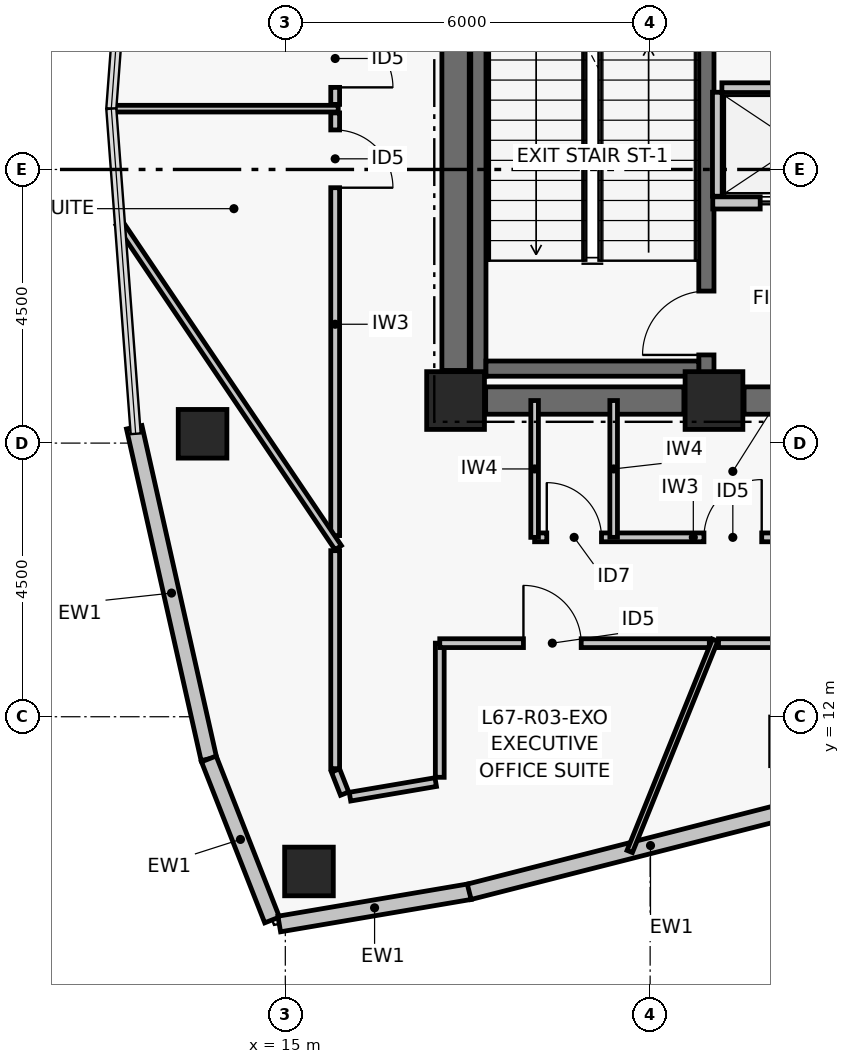
"""IFC4 building model, lengths in metres.
Left out: names, types, materials, properties, quantities, classifications, styles, units other than length and angle.
Written with IfcOpenShell. Run it as: python <this file> out.ifc"""

import sys

from ifc_helpers import new_model, si_unit, direction, frame, frame_2d, origin, origin_2d, place, context, subcontext, project, spatial, rectangle, hollow_rectangle, extrude, element, fill, save


model = new_model("IFC4")
c1 = context("Model", 3, precision=1e-05, world=origin(), true_north=direction((0.0, 1.0)))
c2 = subcontext(c1, "Body", "Model", "MODEL_VIEW")
j1 = project(units=[si_unit("LENGTHUNIT", "METRE"), si_unit("PLANEANGLEUNIT", "RADIAN")], contexts=[c1])
p1 = place(None, origin())
s1 = spatial("IfcSite", under=j1, at=p1, CompositionType="ELEMENT")
p2 = place(p1, origin())
s2 = spatial("IfcBuilding", under=s1, at=p2, CompositionType="ELEMENT")
p3 = place(p2, frame((0.0, 0.0, 265.74)))
s3 = spatial("IfcBuildingStorey", under=s2, at=p3, CompositionType="ELEMENT", Elevation=265.74)
for number, where, z_axis, x_axis in (
    (1, (17.8, 17.2, 0.0), (0.0, 0.0, 1.0), (1.0, 0.0, 0.0)),
    (2, (22.05, 17.2, 0.0), (0.0, 0.0, 1.0), (1.0, 0.0, 0.0)),
):
    element("IfcColumn", number, at=place(p3, frame(where, z_axis=z_axis, x_axis=x_axis)), inside=s3, PredefinedType="COLUMN", context=c2, shape_type="SweptSolid", body=[
        extrude(rectangle(XDim=0.95, YDim=0.95, at=origin_2d()), origin(), (0.0, 0.0, 1.0), 3.72),
    ])
p4 = place(p3, frame((18.295, 17.2, 0.0), z_axis=(0.0, 0.0, 1.0), x_axis=(1.0, 0.0, 0.0)))
e3 = element("IfcWall", 3, at=p4, inside=s3, PredefinedType="SHEAR", context=c2, shape_type="SweptSolid", body=[
    extrude(rectangle(XDim=3.26, YDim=0.45, at=frame_2d((1.63, 0.0))), origin(), (0.0, 0.0, 1.0), 3.5),
])
p5 = place(p3, frame((22.545, 17.2, 0.0), z_axis=(0.0, 0.0, 1.0), x_axis=(1.0, 0.0, 0.0)))
e4 = element("IfcWall", 4, at=p5, inside=s3, PredefinedType="SHEAR", context=c2, shape_type="SweptSolid", body=[
    extrude(rectangle(XDim=1.805, YDim=0.45, at=frame_2d((0.903, 0.0))), origin(), (0.0, 0.0, 1.0), 3.5),
])
p6 = place(p3, frame((17.8, 17.695, 0.0), z_axis=(0.0, 0.0, 1.0), x_axis=(0.0, 1.0, 0.0)))
e5 = element("IfcWall", 5, at=p6, inside=s3, PredefinedType="SHEAR", context=c2, shape_type="SweptSolid", body=[
    extrude(rectangle(XDim=8.61, YDim=0.45, at=frame_2d((4.305, 0.0))), origin(), (0.0, 0.0, 1.0), 3.5),
])
p7 = place(p3, frame((18.175, 17.6, 0.0), z_axis=(0.0, 0.0, 1.0), x_axis=(0.0, 1.0, 0.0)))
e6 = element("IfcWall", 6, at=p7, inside=s3, PredefinedType="SHEAR", context=c2, shape_type="SweptSolid", body=[
    extrude(rectangle(XDim=8.8, YDim=0.25, at=frame_2d((4.4, 0.0))), origin(), (0.0, 0.0, 1.0), 3.5),
])
p8 = place(p3, frame((21.925, 17.6, 0.0), z_axis=(0.0, 0.0, 1.0), x_axis=(0.0, 1.0, 0.0)))
e7 = element("IfcWall", 7, at=p8, inside=s3, PredefinedType="SHEAR", context=c2, shape_type="SweptSolid", body=[
    extrude(rectangle(XDim=8.8, YDim=0.25, at=frame_2d((4.4, 0.0))), origin(), (0.0, 0.0, 1.0), 3.5),
])
p9 = place(p8, frame((0.35, 0.0, 0.0)))
e8 = element("IfcOpeningElement", 8, at=p9, cuts=e7, PredefinedType="OPENING", context=c2, shape_type="SweptSolid", body=[
    extrude(rectangle(XDim=1.05, YDim=2.08, at=frame_2d((0.525, 1.04))), frame((0.0, 0.135, 0.0), z_axis=(0.0, -1.0, 0.0), x_axis=(1.0, 0.0, 0.0)), (0.0, 0.0, 1.0), 0.27),
])
p10 = place(p3, frame((18.3, 17.725, 0.0), z_axis=(0.0, 0.0, 1.0), x_axis=(1.0, 0.0, 0.0)))
e9 = element("IfcWall", 9, at=p10, inside=s3, PredefinedType="SHEAR", context=c2, shape_type="SweptSolid", body=[
    extrude(rectangle(XDim=3.5, YDim=0.25, at=frame_2d((1.75, 0.0))), origin(), (0.0, 0.0, 1.0), 3.5),
])
for number, where, z_axis, x_axis in (
    (10, (13.639, 16.653, 0.0), (0.0, 0.0, 1.0), (1.0, 0.0, 0.0)),
    (11, (15.389, 9.455, 0.0), (0.0, 0.0, 1.0), (1.0, 0.0, 0.0)),
):
    element("IfcColumn", number, at=place(p3, frame(where, z_axis=z_axis, x_axis=x_axis)), inside=s3, PredefinedType="COLUMN", context=c2, shape_type="SweptSolid", body=[
        extrude(hollow_rectangle(XDim=0.8, YDim=0.8, WallThickness=0.035, at=origin_2d()), origin(), (0.0, 0.0, 1.0), 3.72),
    ])
p11 = place(p3, frame((13.742, 11.307, 0.0), z_axis=(0.0, 0.0, 1.0), x_axis=(-0.219500763731, 0.97561232809, 0.0)))
e12 = element("IfcWall", 12, at=p11, inside=s3, PredefinedType="PARTITIONING", context=c2, shape_type="SweptSolid", body=[
    extrude(rectangle(XDim=5.59, YDim=0.26, at=frame_2d((2.795, 0.0))), origin(), (0.0, 0.0, 1.0), 3.5),
])
p12 = place(p3, frame((14.782, 8.658, 0.0), z_axis=(0.0, 0.0, 1.0), x_axis=(-0.36559927932, 0.930772349697, 0.0)))
e13 = element("IfcWall", 13, at=p12, inside=s3, PredefinedType="PARTITIONING", context=c2, shape_type="SweptSolid", body=[
    extrude(rectangle(XDim=2.845, YDim=0.26, at=frame_2d((1.423, 0.0))), origin(), (0.0, 0.0, 1.0), 3.5),
])
p13 = place(p3, frame((18.036, 9.124, 0.0), z_axis=(0.0, 0.0, 1.0), x_axis=(-0.985889432766, -0.167397808709, 0.0)))
e14 = element("IfcWall", 14, at=p13, inside=s3, PredefinedType="PARTITIONING", context=c2, shape_type="SweptSolid", body=[
    extrude(rectangle(XDim=3.181, YDim=0.26, at=frame_2d((1.59, 0.0))), origin(), (0.0, 0.0, 1.0), 3.5),
])
p14 = place(p3, frame((23.988, 10.642, 0.0), z_axis=(0.0, 0.0, 1.0), x_axis=(-0.968988278672, -0.247106689096, 0.0)))
e15 = element("IfcWall", 15, at=p14, inside=s3, PredefinedType="PARTITIONING", context=c2, shape_type="SweptSolid", body=[
    extrude(rectangle(XDim=6.154, YDim=0.26, at=frame_2d((3.077, 0.0))), origin(), (0.0, 0.0, 1.0), 3.5),
])
p15 = place(p3, frame((22.03, 20.45, 0.0), z_axis=(0.0, 0.0, 1.0), x_axis=(1.0, 0.0, 0.0)))
e16 = element("IfcWall", 16, at=p15, inside=s3, PredefinedType="PARTITIONING", context=c2, shape_type="SweptSolid", body=[
    extrude(rectangle(XDim=2.8, YDim=0.2, at=frame_2d((1.4, 0.0))), origin(), (0.0, 0.0, 1.0), 3.5),
])
p16 = place(p15, frame((0.78, 0.0, 0.0)))
e17 = element("IfcOpeningElement", 17, at=p16, cuts=e16, PredefinedType="OPENING", context=c2, shape_type="SweptSolid", body=[
    extrude(rectangle(XDim=1.1, YDim=2.08, at=frame_2d((0.55, 1.04))), frame((0.0, 0.11, 0.0), z_axis=(0.0, -1.0, 0.0), x_axis=(1.0, 0.0, 0.0)), (0.0, 0.0, 1.0), 0.22),
])
p17 = place(p3, frame((22.105, 20.56, 0.0), z_axis=(0.0, 0.0, 1.0), x_axis=(0.0, 1.0, 0.0)))
e18 = element("IfcWall", 18, at=p17, inside=s3, PredefinedType="PARTITIONING", context=c2, shape_type="SweptSolid", body=[
    extrude(rectangle(XDim=1.71, YDim=0.16, at=frame_2d((0.855, 0.0))), origin(), (0.0, 0.0, 1.0), 3.5),
])
p18 = place(p3, frame((22.18, 22.345, 0.0), z_axis=(0.0, 0.0, 1.0), x_axis=(1.0, 0.0, 0.0)))
e19 = element("IfcWall", 19, at=p18, inside=s3, PredefinedType="PARTITIONING", context=c2, shape_type="SweptSolid", body=[
    extrude(rectangle(XDim=2.65, YDim=0.16, at=frame_2d((1.325, 0.0))), origin(), (0.0, 0.0, 1.0), 3.5),
])
p19 = place(p3, frame((19.1, 14.95, 0.0), z_axis=(0.0, 0.0, 1.0), x_axis=(1.0, 0.0, 0.0)))
e20 = element("IfcWall", 20, at=p19, inside=s3, PredefinedType="PARTITIONING", context=c2, shape_type="SweptSolid", body=[
    extrude(rectangle(XDim=5.22, YDim=0.145, at=frame_2d((2.61, 0.0))), origin(), (0.0, 0.0, 1.0), 2.78),
])
p20 = place(p19, frame((0.2, 0.0, 0.0)))
e21 = element("IfcOpeningElement", 21, at=p20, cuts=e20, PredefinedType="OPENING", context=c2, shape_type="SweptSolid", body=[
    extrude(rectangle(XDim=0.9, YDim=2.02, at=frame_2d((0.45, 1.01))), frame((0.0, 0.083, 0.0), z_axis=(0.0, -1.0, 0.0), x_axis=(1.0, 0.0, 0.0)), (0.0, 0.0, 1.0), 0.165),
])
p21 = place(p19, frame((2.785, 0.0, 0.0)))
e22 = element("IfcOpeningElement", 22, at=p21, cuts=e20, PredefinedType="OPENING", context=c2, shape_type="SweptSolid", body=[
    extrude(rectangle(XDim=0.95, YDim=2.06, at=frame_2d((0.475, 1.03))), frame((0.0, 0.083, 0.0), z_axis=(0.0, -1.0, 0.0), x_axis=(1.0, 0.0, 0.0)), (0.0, 0.0, 1.0), 0.165),
])
for number, where, z_axis, x_axis in (
    (23, (19.1, 14.95, 0.0), (0.0, 0.0, 1.0), (0.0, 1.0, 0.0)),
    (24, (20.4, 14.95, 0.0), (0.0, 0.0, 1.0), (0.0, 1.0, 0.0)),
):
    element("IfcWall", number, at=place(p3, frame(where, z_axis=z_axis, x_axis=x_axis)), inside=s3, PredefinedType="PARTITIONING", context=c2, shape_type="SweptSolid", body=[
        extrude(rectangle(XDim=2.25, YDim=0.125, at=frame_2d((1.125, 0.0))), origin(), (0.0, 0.0, 1.0), 2.63),
    ])
p22 = place(p3, frame((15.82, 21.93, 0.0), z_axis=(0.0, 0.0, 1.0), x_axis=(0.0, -1.0, 0.0)))
e25 = element("IfcWall", 25, at=p22, inside=s3, PredefinedType="PARTITIONING", context=c2, shape_type="SweptSolid", body=[
    extrude(rectangle(XDim=6.951, YDim=0.145, at=frame_2d((3.475, 0.0))), origin(), (0.0, 0.0, 1.0), 2.78),
])
p23 = place(p22, frame((0.28, 0.0, 0.0)))
e26 = element("IfcOpeningElement", 26, at=p23, cuts=e25, PredefinedType="OPENING", context=c2, shape_type="SweptSolid", body=[
    extrude(rectangle(XDim=0.95, YDim=2.06, at=frame_2d((0.475, 1.03))), frame((0.0, 0.083, 0.0), z_axis=(0.0, -1.0, 0.0), x_axis=(1.0, 0.0, 0.0)), (0.0, 0.0, 1.0), 0.165),
])
p24 = place(p3, frame((15.82, 14.731, 0.0), z_axis=(0.0, 0.0, 1.0), x_axis=(0.0, -1.0, 0.0)))
e27 = element("IfcWall", 27, at=p24, inside=s3, PredefinedType="PARTITIONING", context=c2, shape_type="SweptSolid", body=[
    extrude(rectangle(XDim=3.585, YDim=0.145, at=frame_2d((1.792, 0.0))), origin(), (0.0, 0.0, 1.0), 2.78),
])
p25 = place(p3, frame((15.825, 11.117, 0.0), z_axis=(0.0, 0.0, 1.0), x_axis=(0.365633948196, -0.930758731319, 0.0)))
e28 = element("IfcWall", 28, at=p25, inside=s3, PredefinedType="PARTITIONING", context=c2, shape_type="SweptSolid", body=[
    extrude(rectangle(XDim=0.41, YDim=0.145, at=frame_2d((0.205, 0.0))), origin(), (0.0, 0.0, 1.0), 2.78),
])
p26 = place(p3, frame((16.063, 10.686, 0.0), z_axis=(0.0, 0.0, 1.0), x_axis=(0.985881780308, 0.167442871621, 0.0)))
e29 = element("IfcWall", 29, at=p26, inside=s3, PredefinedType="PARTITIONING", context=c2, shape_type="SweptSolid", body=[
    extrude(rectangle(XDim=1.43, YDim=0.145, at=frame_2d((0.715, 0.0))), origin(), (0.0, 0.0, 1.0), 3.13),
])
p27 = place(p3, frame((17.54, 11.004, 0.0), z_axis=(0.0, 0.0, 1.0), x_axis=(0.0, 1.0, 0.0)))
e30 = element("IfcWall", 30, at=p27, inside=s3, PredefinedType="PARTITIONING", context=c2, shape_type="SweptSolid", body=[
    extrude(rectangle(XDim=2.206, YDim=0.145, at=frame_2d((1.103, 0.0))), origin(), (0.0, 0.0, 1.0), 3.13),
])
p28 = place(p3, frame((17.54, 13.21, 0.0), z_axis=(0.0, 0.0, 1.0), x_axis=(1.0, 0.0, 0.0)))
e31 = element("IfcWall", 31, at=p28, inside=s3, PredefinedType="PARTITIONING", context=c2, shape_type="SweptSolid", body=[
    extrude(rectangle(XDim=4.433, YDim=0.145, at=frame_2d((2.217, 0.0))), origin(), (0.0, 0.0, 1.0), 3.13),
])
p29 = place(p28, frame((1.376, 0.0, 0.0)))
e32 = element("IfcOpeningElement", 32, at=p29, cuts=e31, PredefinedType="OPENING", context=c2, shape_type="SweptSolid", body=[
    extrude(rectangle(XDim=0.95, YDim=2.06, at=frame_2d((0.475, 1.03))), frame((0.0, 0.083, 0.0), z_axis=(0.0, -1.0, 0.0), x_axis=(1.0, 0.0, 0.0)), (0.0, 0.0, 1.0), 0.165),
])
p30 = place(p3, frame((22.124, 13.21, 0.0), z_axis=(0.0, 0.0, 1.0), x_axis=(1.0, 0.0, 0.0)))
e33 = element("IfcWall", 33, at=p30, inside=s3, PredefinedType="PARTITIONING", context=c2, shape_type="SweptSolid", body=[
    extrude(rectangle(XDim=6.986, YDim=0.145, at=frame_2d((3.493, 0.0))), origin(), (0.0, 0.0, 1.0), 2.78),
])
p31 = place(p30, frame((5.098, 0.0, 0.0)))
e34 = element("IfcOpeningElement", 34, at=p31, cuts=e33, PredefinedType="OPENING", context=c2, shape_type="SweptSolid", body=[
    extrude(rectangle(XDim=0.92, YDim=2.05, at=frame_2d((0.46, 1.025))), frame((0.0, 0.083, 0.0), z_axis=(0.0, -1.0, 0.0), x_axis=(1.0, 0.0, 0.0)), (0.0, 0.0, 1.0), 0.165),
])
p32 = place(p3, frame((15.82, 32.854, 0.0), z_axis=(0.0, 0.0, 1.0), x_axis=(0.0, -1.0, 0.0)))
e35 = element("IfcWall", 35, at=p32, inside=s3, PredefinedType="PARTITIONING", context=c2, shape_type="SweptSolid", body=[
    extrude(rectangle(XDim=10.784, YDim=0.145, at=frame_2d((5.392, 0.0))), origin(), (0.0, 0.0, 1.0), 2.78),
])
p33 = place(p32, frame((9.554, 0.0, 0.0)))
e36 = element("IfcOpeningElement", 36, at=p33, cuts=e35, PredefinedType="OPENING", context=c2, shape_type="SweptSolid", body=[
    extrude(rectangle(XDim=0.95, YDim=2.06, at=frame_2d((0.475, 1.03))), frame((0.0, 0.083, 0.0), z_axis=(0.0, -1.0, 0.0), x_axis=(1.0, 0.0, 0.0)), (0.0, 0.0, 1.0), 0.165),
])
p34 = place(p3, frame((15.87, 22.0, 0.0), z_axis=(0.0, 0.0, 1.0), x_axis=(-1.0, 0.0, 0.0)))
e37 = element("IfcWall", 37, at=p34, inside=s3, PredefinedType="PARTITIONING", context=c2, shape_type="SweptSolid", body=[
    extrude(rectangle(XDim=3.742, YDim=0.11, at=frame_2d((1.871, 0.0))), origin(), (0.0, 0.0, 1.0), 2.98),
])
p35 = place(p3, frame((22.069, 13.26, 0.0), z_axis=(0.0, 0.0, 1.0), x_axis=(-0.374599797966, -0.927186600078, 0.0)))
e38 = element("IfcWall", 38, at=p35, inside=s3, PredefinedType="PARTITIONING", context=c2, shape_type="SweptSolid", body=[
    extrude(rectangle(XDim=3.749, YDim=0.095, at=frame_2d((1.875, 0.0))), origin(), (0.0, 0.0, 1.0), 2.98),
])
p36 = place(p3, frame((12.269, 20.118, 0.0), z_axis=(0.0, 0.0, 1.0), x_axis=(0.559206512114, -0.829028393247, 0.0)))
e39 = element("IfcWall", 39, at=p36, inside=s3, PredefinedType="PARTITIONING", context=c2, shape_type="SweptSolid", body=[
    extrude(rectangle(XDim=6.44, YDim=0.125, at=frame_2d((3.22, 0.0))), origin(), (0.0, 0.0, 1.0), 2.78),
])
p37 = place(p9, origin())
e40 = element("IfcDoor", 40, at=p37, inside=s3, OperationType="SINGLE_SWING_LEFT", PredefinedType="DOOR", context=c2, shape_type="SweptSolid", body=[
    extrude(rectangle(XDim=1.05, YDim=2.08, at=frame_2d((0.525, 1.04))), frame((0.0, 0.025, 0.0), z_axis=(0.0, -1.0, 0.0), x_axis=(1.0, 0.0, 0.0)), (0.0, 0.0, 1.0), 0.05),
])
fill(e8, e40)
p38 = place(p16, origin())
e41 = element("IfcDoor", 41, at=p38, inside=s3, OperationType="DOUBLE_DOOR_SLIDING", PredefinedType="DOOR", context=c2, shape_type="SweptSolid", body=[
    extrude(rectangle(XDim=1.1, YDim=2.08, at=frame_2d((0.55, 1.04))), frame((0.0, 0.025, 0.0), z_axis=(0.0, -1.0, 0.0), x_axis=(1.0, 0.0, 0.0)), (0.0, 0.0, 1.0), 0.05),
])
fill(e17, e41)
p39 = place(p20, origin())
e42 = element("IfcDoor", 42, at=p39, inside=s3, OperationType="SINGLE_SWING_LEFT", PredefinedType="DOOR", context=c2, shape_type="SweptSolid", body=[
    extrude(rectangle(XDim=0.9, YDim=2.02, at=frame_2d((0.45, 1.01))), frame((0.0, 0.025, 0.0), z_axis=(0.0, -1.0, 0.0), x_axis=(1.0, 0.0, 0.0)), (0.0, 0.0, 1.0), 0.05),
])
fill(e21, e42)
p40 = place(p21, origin())
e43 = element("IfcDoor", 43, at=p40, inside=s3, OperationType="SINGLE_SWING_RIGHT", PredefinedType="DOOR", context=c2, shape_type="SweptSolid", body=[
    extrude(rectangle(XDim=0.95, YDim=2.06, at=frame_2d((0.475, 1.03))), frame((0.0, 0.025, 0.0), z_axis=(0.0, -1.0, 0.0), x_axis=(1.0, 0.0, 0.0)), (0.0, 0.0, 1.0), 0.05),
])
fill(e22, e43)
p41 = place(p23, origin())
e44 = element("IfcDoor", 44, at=p41, inside=s3, OperationType="SINGLE_SWING_RIGHT", PredefinedType="DOOR", context=c2, shape_type="SweptSolid", body=[
    extrude(rectangle(XDim=0.95, YDim=2.06, at=frame_2d((0.475, 1.03))), frame((0.0, 0.025, 0.0), z_axis=(0.0, -1.0, 0.0), x_axis=(1.0, 0.0, 0.0)), (0.0, 0.0, 1.0), 0.05),
])
fill(e26, e44)
p42 = place(p29, origin())
e45 = element("IfcDoor", 45, at=p42, inside=s3, OperationType="SINGLE_SWING_LEFT", PredefinedType="DOOR", context=c2, shape_type="SweptSolid", body=[
    extrude(rectangle(XDim=0.95, YDim=2.06, at=frame_2d((0.475, 1.03))), frame((0.0, 0.025, 0.0), z_axis=(0.0, -1.0, 0.0), x_axis=(1.0, 0.0, 0.0)), (0.0, 0.0, 1.0), 0.05),
])
fill(e32, e45)
p43 = place(p33, origin())
e46 = element("IfcDoor", 46, at=p43, inside=s3, OperationType="SINGLE_SWING_RIGHT", PredefinedType="DOOR", context=c2, shape_type="SweptSolid", body=[
    extrude(rectangle(XDim=0.95, YDim=2.06, at=frame_2d((0.475, 1.03))), frame((0.0, 0.025, 0.0), z_axis=(0.0, -1.0, 0.0), x_axis=(1.0, 0.0, 0.0)), (0.0, 0.0, 1.0), 0.05),
])
fill(e36, e46)
save(model, sys.argv[1])
